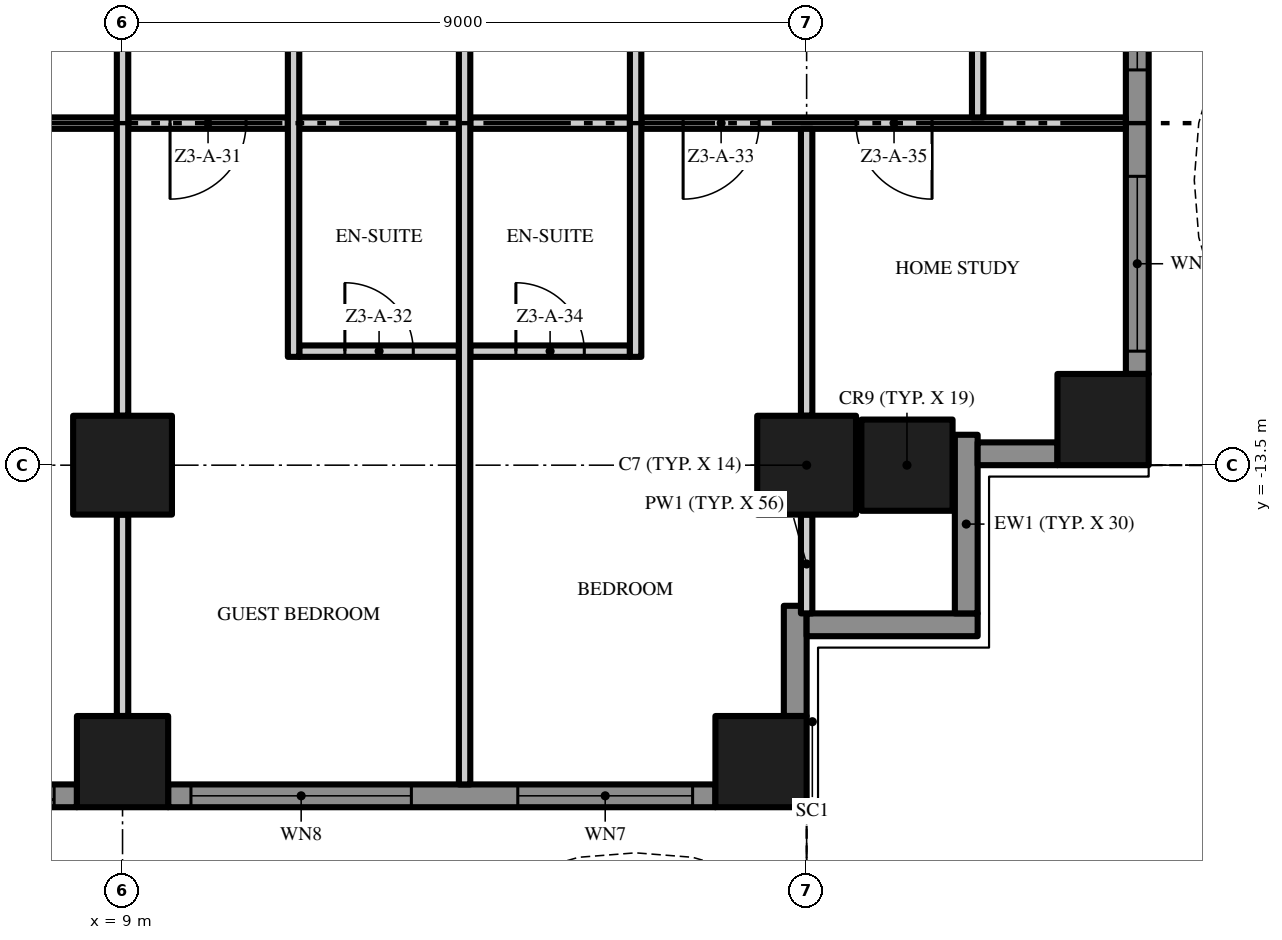
"""IFC4 building model, lengths in metres.
Left out: names, types, materials, properties, quantities, classifications, styles, units other than length and angle.
Written with IfcOpenShell. Run it as: python <this file> out.ifc"""

import sys

from ifc_helpers import new_model, si_unit, direction, frame, frame_2d, origin, origin_2d, place, context, subcontext, project, spatial, polyline, rectangle, outline, extrude, element, fill, save


model = new_model("IFC4")
c1 = context("Model", 3, precision=1e-05, world=origin(), true_north=direction((0.0, 1.0)))
c2 = subcontext(c1, "Body", "Model", "MODEL_VIEW")
j1 = project(units=[si_unit("LENGTHUNIT", "METRE"), si_unit("PLANEANGLEUNIT", "RADIAN")], contexts=[c1])
p1 = place(None, origin())
s1 = spatial("IfcSite", under=j1, at=p1, CompositionType="ELEMENT")
p2 = place(p1, origin())
s2 = spatial("IfcBuilding", under=s1, at=p2, CompositionType="ELEMENT")
p3 = place(p2, frame((0.0, 0.0, 128.8)))
s3 = spatial("IfcBuildingStorey", under=s2, at=p3, CompositionType="ELEMENT", Elevation=128.8)
p4 = place(p3, frame((18.0, -13.5, 0.0), z_axis=(0.0, 0.0, 1.0), x_axis=(1.0, 0.0, 0.0)))
e1 = element("IfcColumn", 1, at=p4, inside=s3, PredefinedType="COLUMN", context=c2, shape_type="SweptSolid", body=[
    extrude(rectangle(XDim=1.3, YDim=1.3, at=origin_2d()), origin(), (0.0, 0.0, 1.0), 3.5),
])
for number, where, z_axis, x_axis in (
    (2, (17.4, -17.4, 0.0), (0.0, 0.0, 1.0), (1.0, 0.0, 0.0)),
    (3, (21.9, -12.9, 0.0), (0.0, 0.0, 1.0), (1.0, 0.0, 0.0)),
    (4, (19.32, -13.5, 0.0), (0.0, 0.0, 1.0), (1.0, 0.0, 0.0)),
):
    element("IfcColumn", number, at=place(p3, frame(where, z_axis=z_axis, x_axis=x_axis)), inside=s3, PredefinedType="COLUMN", context=c2, shape_type="SweptSolid", body=[
        extrude(rectangle(XDim=1.2, YDim=1.2, at=origin_2d()), origin(), (0.0, 0.0, 1.0), 3.5),
    ])
p5 = place(p3, frame((9.0, -13.5, 0.0), z_axis=(0.0, 0.0, 1.0), x_axis=(1.0, 0.0, 0.0)))
e5 = element("IfcColumn", 5, at=p5, inside=s3, PredefinedType="COLUMN", context=c2, shape_type="SweptSolid", body=[
    extrude(rectangle(XDim=1.3, YDim=1.3, at=origin_2d()), origin(), (0.0, 0.0, 1.0), 3.5),
])
p6 = place(p3, frame((9.0, -17.4, 0.0), z_axis=(0.0, 0.0, 1.0), x_axis=(1.0, 0.0, 0.0)))
e6 = element("IfcColumn", 6, at=p6, inside=s3, PredefinedType="COLUMN", context=c2, shape_type="SweptSolid", body=[
    extrude(rectangle(XDim=1.2, YDim=1.2, at=origin_2d()), origin(), (0.0, 0.0, 1.0), 3.5),
])
p7 = place(p3, frame((8.4, -17.85, 0.0), z_axis=(0.0, 0.0, 1.0), x_axis=(-1.0, 0.0, 0.0)))
e7 = element("IfcWall", 7, at=p7, inside=s3, PredefinedType="SOLIDWALL", context=c2, shape_type="SweptSolid", body=[
    extrude(rectangle(XDim=7.8, YDim=0.3, at=frame_2d((3.9, 0.0))), origin(), (0.0, 0.0, 1.0), 3.5),
])
p8 = place(p7, frame((4.6, 0.0, 0.45)))
e8 = element("IfcOpeningElement", 8, at=p8, cuts=e7, PredefinedType="OPENING", context=c2, shape_type="SweptSolid", body=[
    extrude(rectangle(XDim=2.9, YDim=2.65, at=frame_2d((1.45, 1.325))), frame((0.0, 0.16, 0.0), z_axis=(0.0, -1.0, 0.0), x_axis=(1.0, 0.0, 0.0)), (0.0, 0.0, 1.0), 0.32),
])
p9 = place(p7, frame((0.3, 0.0, 0.0)))
e9 = element("IfcOpeningElement", 9, at=p9, cuts=e7, PredefinedType="OPENING", context=c2, shape_type="SweptSolid", body=[
    extrude(rectangle(XDim=2.9, YDim=2.4, at=frame_2d((1.45, 1.2))), frame((0.0, 0.16, 0.0), z_axis=(0.0, -1.0, 0.0), x_axis=(1.0, 0.0, 0.0)), (0.0, 0.0, 1.0), 0.32),
])
p10 = place(p3, frame((16.8, -17.85, 0.0), z_axis=(0.0, 0.0, 1.0), x_axis=(-1.0, 0.0, 0.0)))
e10 = element("IfcWall", 10, at=p10, inside=s3, PredefinedType="SOLIDWALL", context=c2, shape_type="SweptSolid", body=[
    extrude(rectangle(XDim=7.2, YDim=0.3, at=frame_2d((3.6, 0.0))), origin(), (0.0, 0.0, 1.0), 3.5),
])
p11 = place(p10, frame((4.0, 0.0, 0.45)))
e11 = element("IfcOpeningElement", 11, at=p11, cuts=e10, PredefinedType="OPENING", context=c2, shape_type="SweptSolid", body=[
    extrude(rectangle(XDim=2.9, YDim=2.65, at=frame_2d((1.45, 1.325))), frame((0.0, 0.16, 0.0), z_axis=(0.0, -1.0, 0.0), x_axis=(1.0, 0.0, 0.0)), (0.0, 0.0, 1.0), 0.32),
])
p12 = place(p10, frame((0.3, 0.0, 0.45)))
e12 = element("IfcOpeningElement", 12, at=p12, cuts=e10, PredefinedType="OPENING", context=c2, shape_type="SweptSolid", body=[
    extrude(rectangle(XDim=2.3, YDim=2.65, at=frame_2d((1.15, 1.325))), frame((0.0, 0.16, 0.0), z_axis=(0.0, -1.0, 0.0), x_axis=(1.0, 0.0, 0.0)), (0.0, 0.0, 1.0), 0.32),
])
p13 = place(p3, frame((17.85, -15.35, 0.0), z_axis=(0.0, 0.0, 1.0), x_axis=(0.0, -1.0, 0.0)))
e13 = element("IfcWall", 13, at=p13, inside=s3, PredefinedType="SOLIDWALL", context=c2, shape_type="SweptSolid", body=[
    extrude(rectangle(XDim=1.45, YDim=0.3, at=frame_2d((0.725, 0.0))), origin(), (0.0, 0.0, 1.0), 3.5),
])
p14 = place(p3, frame((20.25, -15.6, 0.0), z_axis=(0.0, 0.0, 1.0), x_axis=(-1.0, 0.0, 0.0)))
e14 = element("IfcWall", 14, at=p14, inside=s3, PredefinedType="SOLIDWALL", context=c2, shape_type="SweptSolid", body=[
    extrude(rectangle(XDim=2.25, YDim=0.3, at=frame_2d((1.125, 0.0))), origin(), (0.0, 0.0, 1.0), 3.5),
])
p15 = place(p3, frame((20.1, -13.1, 0.0), z_axis=(0.0, 0.0, 1.0), x_axis=(0.0, -1.0, 0.0)))
e15 = element("IfcWall", 15, at=p15, inside=s3, PredefinedType="SOLIDWALL", context=c2, shape_type="SweptSolid", body=[
    extrude(rectangle(XDim=2.35, YDim=0.3, at=frame_2d((1.175, 0.0))), origin(), (0.0, 0.0, 1.0), 3.5),
])
p16 = place(p3, frame((21.3, -13.35, 0.0), z_axis=(0.0, 0.0, 1.0), x_axis=(-1.0, 0.0, 0.0)))
e16 = element("IfcWall", 16, at=p16, inside=s3, PredefinedType="SOLIDWALL", context=c2, shape_type="SweptSolid", body=[
    extrude(rectangle(XDim=1.05, YDim=0.3, at=frame_2d((0.525, 0.0))), origin(), (0.0, 0.0, 1.0), 3.5),
])
p17 = place(p3, frame((22.35, -5.1, 0.0), z_axis=(0.0, 0.0, 1.0), x_axis=(0.0, -1.0, 0.0)))
e17 = element("IfcWall", 17, at=p17, inside=s3, PredefinedType="SOLIDWALL", context=c2, shape_type="SweptSolid", body=[
    extrude(rectangle(XDim=7.2, YDim=0.3, at=frame_2d((3.6, 0.0))), origin(), (0.0, 0.0, 1.0), 3.5),
])
p18 = place(p17, frame((4.6, 0.0, 0.45)))
e18 = element("IfcOpeningElement", 18, at=p18, cuts=e17, PredefinedType="OPENING", context=c2, shape_type="SweptSolid", body=[
    extrude(rectangle(XDim=2.3, YDim=2.65, at=frame_2d((1.15, 1.325))), frame((0.0, 0.16, 0.0), z_axis=(0.0, -1.0, 0.0), x_axis=(1.0, 0.0, 0.0)), (0.0, 0.0, 1.0), 0.32),
])
p19 = place(p17, frame((0.3, 0.0, 0.45)))
e19 = element("IfcOpeningElement", 19, at=p19, cuts=e17, PredefinedType="OPENING", context=c2, shape_type="SweptSolid", body=[
    extrude(rectangle(XDim=2.9, YDim=2.65, at=frame_2d((1.45, 1.325))), frame((0.0, 0.16, 0.0), z_axis=(0.0, -1.0, 0.0), x_axis=(1.0, 0.0, 0.0)), (0.0, 0.0, 1.0), 0.32),
])
p20 = place(p3, origin())
e20 = element("IfcWall", 20, at=p20, inside=s3, PredefinedType="USERDEFINED", context=c2, shape_type="SweptSolid", body=[
    extrude(outline(polyline([(-18.0, -19.8), (-16.5, -19.095), (-15.0, -18.659), (-14.25, -18.6), (-13.5, -18.659), (-12.0, -19.095), (-10.5, -19.8), (-9.0, -20.505), (-7.5, -20.941), (-6.75, -21.0), (-6.0, -20.941), (-4.5, -20.505), (-3.0, -19.8), (-1.5, -19.095), (0.0, -18.659), (0.75, -18.6), (1.5, -18.659), (3.0, -19.095), (4.5, -19.8), (6.0, -20.505), (7.5, -20.941), (8.25, -21.0), (9.0, -20.941), (10.5, -20.505), (12.0, -19.8), (13.5, -19.095), (15.0, -18.659), (15.75, -18.6), (16.5, -18.659), (18.0, -19.095), (18.07, -18.855), (16.545, -18.411), (15.75, -18.349), (14.955, -18.411), (13.411, -18.86), (11.894, -19.574), (10.411, -20.271), (8.955, -20.694), (8.25, -20.749), (7.545, -20.694), (6.089, -20.271), (4.606, -19.574), (3.089, -18.86), (1.545, -18.411), (0.75, -18.349), (-0.045, -18.411), (-1.589, -18.86), (-3.106, -19.574), (-4.589, -20.271), (-6.045, -20.694), (-6.75, -20.749), (-7.455, -20.694), (-8.911, -20.271), (-10.394, -19.574), (-11.911, -18.86), (-13.455, -18.411), (-14.25, -18.349), (-15.045, -18.411), (-16.589, -18.86), (-18.106, -19.574), (-18.0, -19.8)])), origin(), (0.0, 0.0, 1.0), 0.9),
])
p21 = place(p3, origin())
e21 = element("IfcWall", 21, at=p21, inside=s3, PredefinedType="USERDEFINED", context=c2, shape_type="SweptSolid", body=[
    extrude(outline(polyline([(24.3, -13.5), (23.595, -12.0), (23.159, -10.5), (23.1, -9.75), (23.159, -9.0), (23.595, -7.5), (24.3, -6.0), (25.005, -4.5), (25.441, -3.0), (25.5, -2.25), (25.441, -1.5), (25.005, 0.0), (24.3, 1.5), (23.595, 3.0), (23.159, 4.5), (23.1, 5.25), (23.159, 6.0), (23.595, 7.5), (24.3, 9.0), (25.005, 10.5), (25.441, 12.0), (25.5, 12.75), (25.441, 13.5), (25.005, 15.0), (24.3, 16.5), (23.595, 18.0), (23.368, 17.894), (24.074, 16.394), (24.771, 14.911), (25.194, 13.455), (25.249, 12.75), (25.194, 12.045), (24.771, 10.589), (24.074, 9.106), (23.36, 7.589), (22.911, 6.045), (22.849, 5.25), (22.911, 4.455), (23.36, 2.911), (24.074, 1.394), (24.771, -0.089), (25.194, -1.545), (25.249, -2.25), (25.194, -2.955), (24.771, -4.411), (24.074, -5.894), (23.36, -7.411), (22.911, -8.955), (22.849, -9.75), (22.911, -10.545), (23.36, -12.089), (24.074, -13.606), (24.3, -13.5)])), origin(), (0.0, 0.0, 1.0), 0.9),
])
p22 = place(p3, frame((11.325, -12.0, 0.0), z_axis=(0.0, 0.0, 1.0), x_axis=(1.0, 0.0, 0.0)))
e22 = element("IfcWall", 22, at=p22, inside=s3, PredefinedType="PARTITIONING", context=c2, shape_type="SweptSolid", body=[
    extrude(rectangle(XDim=2.1, YDim=0.15, at=frame_2d((1.05, 0.0))), origin(), (0.0, 0.0, 1.0), 3.5),
])
p23 = place(p22, frame((0.6, 0.0, 0.0)))
e23 = element("IfcOpeningElement", 23, at=p23, cuts=e22, PredefinedType="OPENING", context=c2, shape_type="SweptSolid", body=[
    extrude(rectangle(XDim=0.9, YDim=2.1, at=frame_2d((0.45, 1.05))), frame((0.0, 0.085, 0.0), z_axis=(0.0, -1.0, 0.0), x_axis=(1.0, 0.0, 0.0)), (0.0, 0.0, 1.0), 0.17),
])
p24 = place(p3, frame((13.575, -12.0, 0.0), z_axis=(0.0, 0.0, 1.0), x_axis=(1.0, 0.0, 0.0)))
e24 = element("IfcWall", 24, at=p24, inside=s3, PredefinedType="PARTITIONING", context=c2, shape_type="SweptSolid", body=[
    extrude(rectangle(XDim=2.1, YDim=0.15, at=frame_2d((1.05, 0.0))), origin(), (0.0, 0.0, 1.0), 3.5),
])
p25 = place(p24, frame((0.6, 0.0, 0.0)))
e25 = element("IfcOpeningElement", 25, at=p25, cuts=e24, PredefinedType="OPENING", context=c2, shape_type="SweptSolid", body=[
    extrude(rectangle(XDim=0.9, YDim=2.1, at=frame_2d((0.45, 1.05))), frame((0.0, 0.085, 0.0), z_axis=(0.0, -1.0, 0.0), x_axis=(1.0, 0.0, 0.0)), (0.0, 0.0, 1.0), 0.17),
])
p26 = place(p3, frame((8.925, -9.0, 0.0), z_axis=(0.0, 0.0, 1.0), x_axis=(-1.0, 0.0, 0.0)))
e26 = element("IfcWall", 26, at=p26, inside=s3, PredefinedType="PARTITIONING", context=c2, shape_type="SweptSolid", body=[
    extrude(rectangle(XDim=8.85, YDim=0.15, at=frame_2d((4.425, 0.0))), origin(), (0.0, 0.0, 1.0), 3.5),
])
p27 = place(p26, frame((6.3, 0.0, 0.0)))
e27 = element("IfcOpeningElement", 27, at=p27, cuts=e26, PredefinedType="OPENING", context=c2, shape_type="SweptSolid", body=[
    extrude(rectangle(XDim=1.5, YDim=2.4, at=frame_2d((0.75, 1.2))), frame((0.0, 0.085, 0.0), z_axis=(0.0, -1.0, 0.0), x_axis=(1.0, 0.0, 0.0)), (0.0, 0.0, 1.0), 0.17),
])
p28 = place(p3, frame((11.175, -9.0, 0.0), z_axis=(0.0, 0.0, 1.0), x_axis=(-1.0, 0.0, 0.0)))
e28 = element("IfcWall", 28, at=p28, inside=s3, PredefinedType="PARTITIONING", context=c2, shape_type="SweptSolid", body=[
    extrude(rectangle(XDim=2.1, YDim=0.15, at=frame_2d((1.05, 0.0))), origin(), (0.0, 0.0, 1.0), 3.5),
])
p29 = place(p28, frame((0.55, 0.0, 0.0)))
e29 = element("IfcOpeningElement", 29, at=p29, cuts=e28, PredefinedType="OPENING", context=c2, shape_type="SweptSolid", body=[
    extrude(rectangle(XDim=1.0, YDim=2.4, at=frame_2d((0.5, 1.2))), frame((0.0, 0.085, 0.0), z_axis=(0.0, -1.0, 0.0), x_axis=(1.0, 0.0, 0.0)), (0.0, 0.0, 1.0), 0.17),
])
for number, where, z_axis, x_axis in (
    (30, (11.325, -9.0, 0.0), (0.0, 0.0, 1.0), (1.0, 0.0, 0.0)),
    (31, (13.575, -9.0, 0.0), (0.0, 0.0, 1.0), (1.0, 0.0, 0.0)),
):
    element("IfcWall", number, at=place(p3, frame(where, z_axis=z_axis, x_axis=x_axis)), inside=s3, PredefinedType="PARTITIONING", context=c2, shape_type="SweptSolid", body=[
        extrude(rectangle(XDim=2.1, YDim=0.15, at=frame_2d((1.05, 0.0))), origin(), (0.0, 0.0, 1.0), 3.5),
    ])
p30 = place(p3, frame((22.2, -9.0, 0.0), z_axis=(0.0, 0.0, 1.0), x_axis=(-1.0, 0.0, 0.0)))
e32 = element("IfcWall", 32, at=p30, inside=s3, PredefinedType="PARTITIONING", context=c2, shape_type="SweptSolid", body=[
    extrude(rectangle(XDim=6.375, YDim=0.15, at=frame_2d((3.188, 0.0))), origin(), (0.0, 0.0, 1.0), 3.5),
])
p31 = place(p30, frame((4.825, 0.0, 0.0)))
e33 = element("IfcOpeningElement", 33, at=p31, cuts=e32, PredefinedType="OPENING", context=c2, shape_type="SweptSolid", body=[
    extrude(rectangle(XDim=1.0, YDim=2.4, at=frame_2d((0.5, 1.2))), frame((0.0, 0.085, 0.0), z_axis=(0.0, -1.0, 0.0), x_axis=(1.0, 0.0, 0.0)), (0.0, 0.0, 1.0), 0.17),
])
p32 = place(p30, frame((2.55, 0.0, 0.0)))
e34 = element("IfcOpeningElement", 34, at=p32, cuts=e32, PredefinedType="OPENING", context=c2, shape_type="SweptSolid", body=[
    extrude(rectangle(XDim=1.0, YDim=2.4, at=frame_2d((0.5, 1.2))), frame((0.0, 0.085, 0.0), z_axis=(0.0, -1.0, 0.0), x_axis=(1.0, 0.0, 0.0)), (0.0, 0.0, 1.0), 0.17),
])
p33 = place(p3, frame((9.0, -16.8, 0.0), z_axis=(0.0, 0.0, 1.0), x_axis=(0.0, 1.0, 0.0)))
e35 = element("IfcWall", 35, at=p33, inside=s3, PredefinedType="PARTITIONING", context=c2, shape_type="SweptSolid", body=[
    extrude(rectangle(XDim=2.65, YDim=0.15, at=frame_2d((1.325, 0.0))), origin(), (0.0, 0.0, 1.0), 3.5),
])
p34 = place(p3, frame((9.0, -12.85, 0.0), z_axis=(0.0, 0.0, 1.0), x_axis=(0.0, 1.0, 0.0)))
e36 = element("IfcWall", 36, at=p34, inside=s3, PredefinedType="PARTITIONING", context=c2, shape_type="SweptSolid", body=[
    extrude(rectangle(XDim=7.7, YDim=0.15, at=frame_2d((3.85, 0.0))), origin(), (0.0, 0.0, 1.0), 3.5),
])
p35 = place(p3, frame((11.25, -12.075, 0.0), z_axis=(0.0, 0.0, 1.0), x_axis=(0.0, 1.0, 0.0)))
e37 = element("IfcWall", 37, at=p35, inside=s3, PredefinedType="PARTITIONING", context=c2, shape_type="SweptSolid", body=[
    extrude(rectangle(XDim=7.65, YDim=0.15, at=frame_2d((3.825, 0.0))), origin(), (0.0, 0.0, 1.0), 3.5),
])
p36 = place(p3, frame((13.5, -17.7, 0.0), z_axis=(0.0, 0.0, 1.0), x_axis=(0.0, 1.0, 0.0)))
e38 = element("IfcWall", 38, at=p36, inside=s3, PredefinedType="PARTITIONING", context=c2, shape_type="SweptSolid", body=[
    extrude(rectangle(XDim=13.125, YDim=0.15, at=frame_2d((6.562, 0.0))), origin(), (0.0, 0.0, 1.0), 3.5),
])
p37 = place(p3, frame((15.75, -12.075, 0.0), z_axis=(0.0, 0.0, 1.0), x_axis=(0.0, 1.0, 0.0)))
e39 = element("IfcWall", 39, at=p37, inside=s3, PredefinedType="PARTITIONING", context=c2, shape_type="SweptSolid", body=[
    extrude(rectangle(XDim=7.65, YDim=0.15, at=frame_2d((3.825, 0.0))), origin(), (0.0, 0.0, 1.0), 3.5),
])
p38 = place(p3, frame((18.0, -15.45, 0.0), z_axis=(0.0, 0.0, 1.0), x_axis=(0.0, 1.0, 0.0)))
e40 = element("IfcWall", 40, at=p38, inside=s3, PredefinedType="PARTITIONING", context=c2, shape_type="SweptSolid", body=[
    extrude(rectangle(XDim=1.3, YDim=0.15, at=frame_2d((0.65, 0.0))), origin(), (0.0, 0.0, 1.0), 3.5),
])
p39 = place(p3, frame((18.0, -12.85, 0.0), z_axis=(0.0, 0.0, 1.0), x_axis=(0.0, 1.0, 0.0)))
e41 = element("IfcWall", 41, at=p39, inside=s3, PredefinedType="PARTITIONING", context=c2, shape_type="SweptSolid", body=[
    extrude(rectangle(XDim=3.775, YDim=0.15, at=frame_2d((1.887, 0.0))), origin(), (0.0, 0.0, 1.0), 3.5),
])
p40 = place(p3, frame((20.25, -4.425, 0.0), z_axis=(0.0, 0.0, 1.0), x_axis=(0.0, -1.0, 0.0)))
e42 = element("IfcWall", 42, at=p40, inside=s3, PredefinedType="PARTITIONING", context=c2, shape_type="SweptSolid", body=[
    extrude(rectangle(XDim=4.5, YDim=0.15, at=frame_2d((2.25, 0.0))), origin(), (0.0, 0.0, 1.0), 3.5),
])
p41 = place(p40, frame((1.95, 0.0, 0.0)))
e43 = element("IfcOpeningElement", 43, at=p41, cuts=e42, PredefinedType="OPENING", context=c2, shape_type="SweptSolid", body=[
    extrude(rectangle(XDim=0.8, YDim=2.0, at=frame_2d((0.4, 1.0))), frame((0.0, 0.085, 0.0), z_axis=(0.0, -1.0, 0.0), x_axis=(1.0, 0.0, 0.0)), (0.0, 0.0, 1.0), 0.17),
])
p42 = place(p9, origin())
e44 = element("IfcDoor", 44, at=p42, inside=s3, OperationType="SINGLE_SWING_LEFT", PredefinedType="DOOR", context=c2, shape_type="SweptSolid", body=[
    extrude(rectangle(XDim=2.9, YDim=2.4, at=frame_2d((1.45, 1.2))), frame((0.0, 0.025, 0.0), z_axis=(0.0, -1.0, 0.0), x_axis=(1.0, 0.0, 0.0)), (0.0, 0.0, 1.0), 0.05),
])
fill(e9, e44)
p43 = place(p11, origin())
e45 = element("IfcWindow", 45, at=p43, inside=s3, PartitioningType="SINGLE_PANEL", PredefinedType="WINDOW", context=c2, shape_type="SweptSolid", body=[
    extrude(rectangle(XDim=2.9, YDim=2.65, at=frame_2d((1.45, 1.325))), frame((0.0, 0.03, 0.0), z_axis=(0.0, -1.0, 0.0), x_axis=(1.0, 0.0, 0.0)), (0.0, 0.0, 1.0), 0.06),
])
fill(e11, e45)
p44 = place(p12, origin())
e46 = element("IfcWindow", 46, at=p44, inside=s3, PartitioningType="SINGLE_PANEL", PredefinedType="WINDOW", context=c2, shape_type="SweptSolid", body=[
    extrude(rectangle(XDim=2.3, YDim=2.65, at=frame_2d((1.15, 1.325))), frame((0.0, 0.03, 0.0), z_axis=(0.0, -1.0, 0.0), x_axis=(1.0, 0.0, 0.0)), (0.0, 0.0, 1.0), 0.06),
])
fill(e12, e46)
p45 = place(p18, origin())
e47 = element("IfcWindow", 47, at=p45, inside=s3, PartitioningType="SINGLE_PANEL", PredefinedType="WINDOW", context=c2, shape_type="SweptSolid", body=[
    extrude(rectangle(XDim=2.3, YDim=2.65, at=frame_2d((1.15, 1.325))), frame((0.0, 0.03, 0.0), z_axis=(0.0, -1.0, 0.0), x_axis=(1.0, 0.0, 0.0)), (0.0, 0.0, 1.0), 0.06),
])
fill(e18, e47)
p46 = place(p19, origin())
e48 = element("IfcWindow", 48, at=p46, inside=s3, PartitioningType="SINGLE_PANEL", PredefinedType="WINDOW", context=c2, shape_type="SweptSolid", body=[
    extrude(rectangle(XDim=2.9, YDim=2.65, at=frame_2d((1.45, 1.325))), frame((0.0, 0.03, 0.0), z_axis=(0.0, -1.0, 0.0), x_axis=(1.0, 0.0, 0.0)), (0.0, 0.0, 1.0), 0.06),
])
fill(e19, e48)
p47 = place(p29, origin())
e49 = element("IfcDoor", 49, at=p47, inside=s3, OperationType="SINGLE_SWING_RIGHT", PredefinedType="DOOR", context=c2, shape_type="SweptSolid", body=[
    extrude(rectangle(XDim=1.0, YDim=2.4, at=frame_2d((0.5, 1.2))), frame((0.0, 0.025, 0.0), z_axis=(0.0, -1.0, 0.0), x_axis=(1.0, 0.0, 0.0)), (0.0, 0.0, 1.0), 0.05),
])
fill(e29, e49)
p48 = place(p23, origin())
e50 = element("IfcDoor", 50, at=p48, inside=s3, OperationType="SINGLE_SWING_LEFT", PredefinedType="DOOR", context=c2, shape_type="SweptSolid", body=[
    extrude(rectangle(XDim=0.9, YDim=2.1, at=frame_2d((0.45, 1.05))), frame((0.0, 0.025, 0.0), z_axis=(0.0, -1.0, 0.0), x_axis=(1.0, 0.0, 0.0)), (0.0, 0.0, 1.0), 0.05),
])
fill(e23, e50)
p49 = place(p31, origin())
e51 = element("IfcDoor", 51, at=p49, inside=s3, OperationType="SINGLE_SWING_RIGHT", PredefinedType="DOOR", context=c2, shape_type="SweptSolid", body=[
    extrude(rectangle(XDim=1.0, YDim=2.4, at=frame_2d((0.5, 1.2))), frame((0.0, 0.025, 0.0), z_axis=(0.0, -1.0, 0.0), x_axis=(1.0, 0.0, 0.0)), (0.0, 0.0, 1.0), 0.05),
])
fill(e33, e51)
p50 = place(p25, origin())
e52 = element("IfcDoor", 52, at=p50, inside=s3, OperationType="SINGLE_SWING_LEFT", PredefinedType="DOOR", context=c2, shape_type="SweptSolid", body=[
    extrude(rectangle(XDim=0.9, YDim=2.1, at=frame_2d((0.45, 1.05))), frame((0.0, 0.025, 0.0), z_axis=(0.0, -1.0, 0.0), x_axis=(1.0, 0.0, 0.0)), (0.0, 0.0, 1.0), 0.05),
])
fill(e25, e52)
p51 = place(p32, origin())
e53 = element("IfcDoor", 53, at=p51, inside=s3, OperationType="SINGLE_SWING_LEFT", PredefinedType="DOOR", context=c2, shape_type="SweptSolid", body=[
    extrude(rectangle(XDim=1.0, YDim=2.4, at=frame_2d((0.5, 1.2))), frame((0.0, 0.025, 0.0), z_axis=(0.0, -1.0, 0.0), x_axis=(1.0, 0.0, 0.0)), (0.0, 0.0, 1.0), 0.05),
])
fill(e34, e53)
save(model, sys.argv[1])
